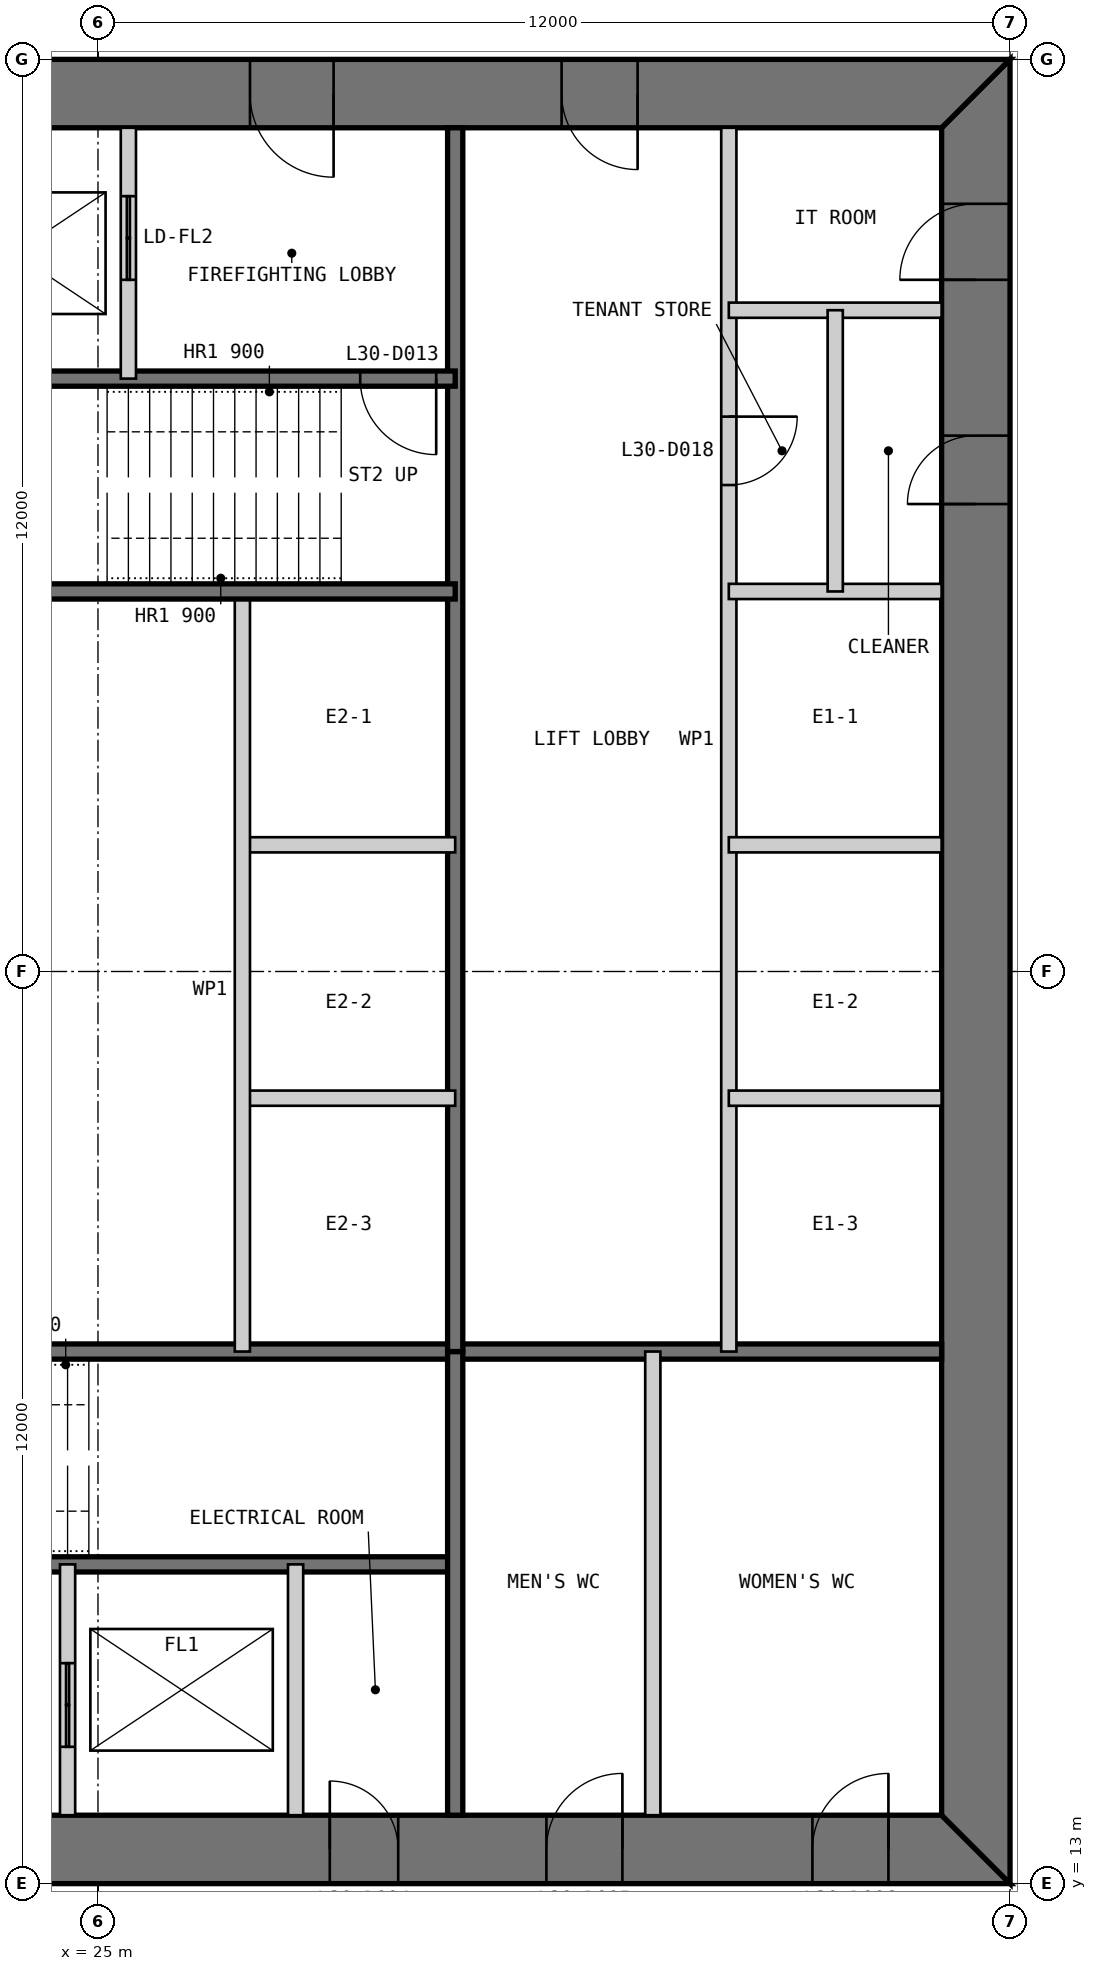
"""IFC4 building model, lengths in metres.
Left out: names, types, materials, properties, quantities, classifications, styles, units other than length and angle.
Written with IfcOpenShell. Run it as: python <this file> out.ifc"""

import sys

from ifc_helpers import new_model, si_unit, direction, frame, frame_2d, origin, place, context, subcontext, project, spatial, polyline, rectangle, outline, extrude, element, fill, save


model = new_model("IFC4")
c1 = context("Model", 3, precision=1e-05, world=origin(), true_north=direction((0.0, 1.0)))
c2 = subcontext(c1, "Body", "Model", "MODEL_VIEW")
j1 = project(units=[si_unit("LENGTHUNIT", "METRE"), si_unit("PLANEANGLEUNIT", "RADIAN")], contexts=[c1])
p1 = place(None, origin())
s1 = spatial("IfcSite", under=j1, at=p1, CompositionType="ELEMENT")
p2 = place(p1, origin())
s2 = spatial("IfcBuilding", under=s1, at=p2, CompositionType="ELEMENT")
p3 = place(p2, frame((0.0, 0.0, 130.4)))
s3 = spatial("IfcBuildingStorey", under=s2, at=p3, CompositionType="ELEMENT", Elevation=130.4)
p4 = place(p3, frame((13.0, 13.45, 0.0), z_axis=(0.0, 0.0, 1.0), x_axis=(1.0, 0.0, 0.0)))
e1 = element("IfcWall", 1, at=p4, inside=s3, PredefinedType="SHEAR", context=c2, shape_type="SweptSolid", body=[
    extrude(outline(polyline([(0.0, -0.45), (24.0, -0.45), (23.1, 0.45), (0.9, 0.45), (0.0, -0.45)])), origin(), (0.0, 0.0, 1.0), 4.0),
])
p5 = place(p4, frame((4.9, 0.0, 0.0)))
e2 = element("IfcOpeningElement", 2, at=p5, cuts=e1, PredefinedType="OPENING", context=c2, shape_type="SweptSolid", body=[
    extrude(rectangle(XDim=1.0, YDim=2.2, at=frame_2d((0.5, 1.1))), frame((0.0, 0.46, 0.0), z_axis=(0.0, -1.0, 0.0), x_axis=(1.0, 0.0, 0.0)), (0.0, 0.0, 1.0), 0.92),
])
p6 = place(p4, frame((8.9, 0.0, 0.0)))
e3 = element("IfcOpeningElement", 3, at=p6, cuts=e1, PredefinedType="OPENING", context=c2, shape_type="SweptSolid", body=[
    extrude(rectangle(XDim=1.1, YDim=2.2, at=frame_2d((0.55, 1.1))), frame((0.0, 0.46, 0.0), z_axis=(0.0, -1.0, 0.0), x_axis=(1.0, 0.0, 0.0)), (0.0, 0.0, 1.0), 0.92),
])
p7 = place(p4, frame((15.05, 0.0, 0.0)))
e4 = element("IfcOpeningElement", 4, at=p7, cuts=e1, PredefinedType="OPENING", context=c2, shape_type="SweptSolid", body=[
    extrude(rectangle(XDim=0.9, YDim=2.2, at=frame_2d((0.45, 1.1))), frame((0.0, 0.46, 0.0), z_axis=(0.0, -1.0, 0.0), x_axis=(1.0, 0.0, 0.0)), (0.0, 0.0, 1.0), 0.92),
])
p8 = place(p4, frame((17.9, 0.0, 0.0)))
e5 = element("IfcOpeningElement", 5, at=p8, cuts=e1, PredefinedType="OPENING", context=c2, shape_type="SweptSolid", body=[
    extrude(rectangle(XDim=1.0, YDim=2.2, at=frame_2d((0.5, 1.1))), frame((0.0, 0.46, 0.0), z_axis=(0.0, -1.0, 0.0), x_axis=(1.0, 0.0, 0.0)), (0.0, 0.0, 1.0), 0.92),
])
p9 = place(p4, frame((21.4, 0.0, 0.0)))
e6 = element("IfcOpeningElement", 6, at=p9, cuts=e1, PredefinedType="OPENING", context=c2, shape_type="SweptSolid", body=[
    extrude(rectangle(XDim=1.0, YDim=2.2, at=frame_2d((0.5, 1.1))), frame((0.0, 0.46, 0.0), z_axis=(0.0, -1.0, 0.0), x_axis=(1.0, 0.0, 0.0)), (0.0, 0.0, 1.0), 0.92),
])
p10 = place(p3, frame((36.55, 13.9, 0.0), z_axis=(0.0, 0.0, 1.0), x_axis=(0.0, 1.0, 0.0)))
e7 = element("IfcWall", 7, at=p10, inside=s3, PredefinedType="SHEAR", context=c2, shape_type="SweptSolid", body=[
    extrude(outline(polyline([(-0.9, -0.45), (23.1, -0.45), (22.2, 0.45), (0.0, 0.45), (-0.9, -0.45)])), origin(), (0.0, 0.0, 1.0), 4.0),
])
p11 = place(p10, frame((20.2, 0.0, 0.0)))
e8 = element("IfcOpeningElement", 8, at=p11, cuts=e7, PredefinedType="OPENING", context=c2, shape_type="SweptSolid", body=[
    extrude(rectangle(XDim=1.0, YDim=2.2, at=frame_2d((0.5, 1.1))), frame((0.0, 0.46, 0.0), z_axis=(0.0, -1.0, 0.0), x_axis=(1.0, 0.0, 0.0)), (0.0, 0.0, 1.0), 0.92),
])
p12 = place(p10, frame((17.25, 0.0, 0.0)))
e9 = element("IfcOpeningElement", 9, at=p12, cuts=e7, PredefinedType="OPENING", context=c2, shape_type="SweptSolid", body=[
    extrude(rectangle(XDim=0.9, YDim=2.2, at=frame_2d((0.45, 1.1))), frame((0.0, 0.46, 0.0), z_axis=(0.0, -1.0, 0.0), x_axis=(1.0, 0.0, 0.0)), (0.0, 0.0, 1.0), 0.92),
])
p13 = place(p3, frame((37.0, 36.55, 0.0), z_axis=(0.0, 0.0, 1.0), x_axis=(-1.0, 0.0, 0.0)))
e10 = element("IfcWall", 10, at=p13, inside=s3, PredefinedType="SHEAR", context=c2, shape_type="SweptSolid", body=[
    extrude(outline(polyline([(0.0, -0.45), (24.0, -0.45), (23.1, 0.45), (0.9, 0.45), (0.0, -0.45)])), origin(), (0.0, 0.0, 1.0), 4.0),
])
p14 = place(p13, frame((4.9, 0.0, 0.0)))
e11 = element("IfcOpeningElement", 11, at=p14, cuts=e10, PredefinedType="OPENING", context=c2, shape_type="SweptSolid", body=[
    extrude(rectangle(XDim=1.0, YDim=2.2, at=frame_2d((0.5, 1.1))), frame((0.0, 0.46, 0.0), z_axis=(0.0, -1.0, 0.0), x_axis=(1.0, 0.0, 0.0)), (0.0, 0.0, 1.0), 0.92),
])
p15 = place(p13, frame((8.9, 0.0, 0.0)))
e12 = element("IfcOpeningElement", 12, at=p15, cuts=e10, PredefinedType="OPENING", context=c2, shape_type="SweptSolid", body=[
    extrude(rectangle(XDim=1.1, YDim=2.2, at=frame_2d((0.55, 1.1))), frame((0.0, 0.46, 0.0), z_axis=(0.0, -1.0, 0.0), x_axis=(1.0, 0.0, 0.0)), (0.0, 0.0, 1.0), 0.92),
])
p16 = place(p13, frame((15.05, 0.0, 0.0)))
e13 = element("IfcOpeningElement", 13, at=p16, cuts=e10, PredefinedType="OPENING", context=c2, shape_type="SweptSolid", body=[
    extrude(rectangle(XDim=0.9, YDim=2.2, at=frame_2d((0.45, 1.1))), frame((0.0, 0.46, 0.0), z_axis=(0.0, -1.0, 0.0), x_axis=(1.0, 0.0, 0.0)), (0.0, 0.0, 1.0), 0.92),
])
p17 = place(p13, frame((17.9, 0.0, 0.0)))
e14 = element("IfcOpeningElement", 14, at=p17, cuts=e10, PredefinedType="OPENING", context=c2, shape_type="SweptSolid", body=[
    extrude(rectangle(XDim=1.0, YDim=2.2, at=frame_2d((0.5, 1.1))), frame((0.0, 0.46, 0.0), z_axis=(0.0, -1.0, 0.0), x_axis=(1.0, 0.0, 0.0)), (0.0, 0.0, 1.0), 0.92),
])
p18 = place(p13, frame((21.4, 0.0, 0.0)))
e15 = element("IfcOpeningElement", 15, at=p18, cuts=e10, PredefinedType="OPENING", context=c2, shape_type="SweptSolid", body=[
    extrude(rectangle(XDim=1.0, YDim=2.2, at=frame_2d((0.5, 1.1))), frame((0.0, 0.46, 0.0), z_axis=(0.0, -1.0, 0.0), x_axis=(1.0, 0.0, 0.0)), (0.0, 0.0, 1.0), 0.92),
])
p19 = place(p3, frame((20.3, 17.2, 0.0), z_axis=(0.0, 0.0, 1.0), x_axis=(1.0, 0.0, 0.0)))
e16 = element("IfcWall", 16, at=p19, inside=s3, PredefinedType="SOLIDWALL", context=c2, shape_type="SweptSolid", body=[
    extrude(rectangle(XDim=9.4, YDim=0.2, at=frame_2d((4.7, 0.0))), origin(), (0.0, 0.0, 1.0), 3.8),
])
p20 = place(p19, frame((0.25, 0.0, 0.0)))
e17 = element("IfcOpeningElement", 17, at=p20, cuts=e16, PredefinedType="OPENING", context=c2, shape_type="SweptSolid", body=[
    extrude(rectangle(XDim=1.0, YDim=2.2, at=frame_2d((0.5, 1.1))), frame((0.0, 0.11, 0.0), z_axis=(0.0, -1.0, 0.0), x_axis=(1.0, 0.0, 0.0)), (0.0, 0.0, 1.0), 0.22),
])
p21 = place(p3, frame((20.3, 20.0, 0.0), z_axis=(0.0, 0.0, 1.0), x_axis=(1.0, 0.0, 0.0)))
e18 = element("IfcWall", 18, at=p21, inside=s3, PredefinedType="SOLIDWALL", context=c2, shape_type="SweptSolid", body=[
    extrude(rectangle(XDim=15.8, YDim=0.2, at=frame_2d((7.9, 0.0))), origin(), (0.0, 0.0, 1.0), 3.8),
])
p22 = place(p3, frame((24.6, 13.9, 0.0), z_axis=(0.0, 0.0, 1.0), x_axis=(0.0, 1.0, 0.0)))
e19 = element("IfcWall", 19, at=p22, inside=s3, PredefinedType="PARTITIONING", context=c2, shape_type="SweptSolid", body=[
    extrude(rectangle(XDim=3.3, YDim=0.2, at=frame_2d((1.65, 0.0))), origin(), (0.0, 0.0, 1.0), 3.8),
])
p23 = place(p22, frame((0.9, 0.0, 0.0)))
e20 = element("IfcOpeningElement", 20, at=p23, cuts=e19, PredefinedType="OPENING", context=c2, shape_type="SweptSolid", body=[
    extrude(rectangle(XDim=1.1, YDim=2.2, at=frame_2d((0.55, 1.1))), frame((0.0, 0.11, 0.0), z_axis=(0.0, -1.0, 0.0), x_axis=(1.0, 0.0, 0.0)), (0.0, 0.0, 1.0), 0.22),
])
p24 = place(p3, frame((27.6, 13.9, 0.0), z_axis=(0.0, 0.0, 1.0), x_axis=(0.0, 1.0, 0.0)))
e21 = element("IfcWall", 21, at=p24, inside=s3, PredefinedType="PARTITIONING", context=c2, shape_type="SweptSolid", body=[
    extrude(rectangle(XDim=3.3, YDim=0.2, at=frame_2d((1.65, 0.0))), origin(), (0.0, 0.0, 1.0), 3.8),
])
p25 = place(p3, frame((29.7, 13.9, 0.0), z_axis=(0.0, 0.0, 1.0), x_axis=(0.0, 1.0, 0.0)))
e22 = element("IfcWall", 22, at=p25, inside=s3, PredefinedType="SOLIDWALL", context=c2, shape_type="SweptSolid", body=[
    extrude(rectangle(XDim=6.1, YDim=0.2, at=frame_2d((3.05, 0.0))), origin(), (0.0, 0.0, 1.0), 3.8),
])
p26 = place(p3, frame((32.3, 13.9, 0.0), z_axis=(0.0, 0.0, 1.0), x_axis=(0.0, 1.0, 0.0)))
e23 = element("IfcWall", 23, at=p26, inside=s3, PredefinedType="PARTITIONING", context=c2, shape_type="SweptSolid", body=[
    extrude(rectangle(XDim=6.1, YDim=0.2, at=frame_2d((3.05, 0.0))), origin(), (0.0, 0.0, 1.0), 3.8),
])
p27 = place(p3, frame((33.3, 36.1, 0.0), z_axis=(0.0, 0.0, 1.0), x_axis=(0.0, -1.0, 0.0)))
e24 = element("IfcWall", 24, at=p27, inside=s3, PredefinedType="PARTITIONING", context=c2, shape_type="SweptSolid", body=[
    extrude(rectangle(XDim=16.1, YDim=0.2, at=frame_2d((8.05, 0.0))), origin(), (0.0, 0.0, 1.0), 3.8),
])
p28 = place(p27, frame((3.8, 0.0, 0.0)))
e25 = element("IfcOpeningElement", 25, at=p28, cuts=e24, PredefinedType="OPENING", context=c2, shape_type="SweptSolid", body=[
    extrude(rectangle(XDim=0.9, YDim=2.2, at=frame_2d((0.45, 1.1))), frame((0.0, 0.11, 0.0), z_axis=(0.0, -1.0, 0.0), x_axis=(1.0, 0.0, 0.0)), (0.0, 0.0, 1.0), 0.22),
])
p29 = place(p3, frame((29.7, 36.1, 0.0), z_axis=(0.0, 0.0, 1.0), x_axis=(0.0, -1.0, 0.0)))
e26 = element("IfcWall", 26, at=p29, inside=s3, PredefinedType="SOLIDWALL", context=c2, shape_type="SweptSolid", body=[
    extrude(rectangle(XDim=16.1, YDim=0.2, at=frame_2d((8.05, 0.0))), origin(), (0.0, 0.0, 1.0), 3.8),
])
for number, where, z_axis, x_axis in (
    (27, (36.1, 30.0, 0.0), (0.0, 0.0, 1.0), (-1.0, 0.0, 0.0)),
    (28, (36.1, 26.667, 0.0), (0.0, 0.0, 1.0), (-1.0, 0.0, 0.0)),
    (29, (36.1, 23.333, 0.0), (0.0, 0.0, 1.0), (-1.0, 0.0, 0.0)),
    (30, (29.7, 26.667, 0.0), (0.0, 0.0, 1.0), (-1.0, 0.0, 0.0)),
    (31, (29.7, 23.333, 0.0), (0.0, 0.0, 1.0), (-1.0, 0.0, 0.0)),
):
    element("IfcWall", number, at=place(p3, frame(where, z_axis=z_axis, x_axis=x_axis)), inside=s3, PredefinedType="PARTITIONING", context=c2, shape_type="SweptSolid", body=[
        extrude(rectangle(XDim=2.8, YDim=0.2, at=frame_2d((1.4, 0.0))), origin(), (0.0, 0.0, 1.0), 3.8),
    ])
p30 = place(p3, frame((26.9, 30.0, 0.0), z_axis=(0.0, 0.0, 1.0), x_axis=(0.0, -1.0, 0.0)))
e32 = element("IfcWall", 32, at=p30, inside=s3, PredefinedType="PARTITIONING", context=c2, shape_type="SweptSolid", body=[
    extrude(rectangle(XDim=10.0, YDim=0.2, at=frame_2d((5.0, 0.0))), origin(), (0.0, 0.0, 1.0), 3.8),
])
p31 = place(p3, frame((29.7, 32.8, 0.0), z_axis=(0.0, 0.0, 1.0), x_axis=(-1.0, 0.0, 0.0)))
e33 = element("IfcWall", 33, at=p31, inside=s3, PredefinedType="SOLIDWALL", context=c2, shape_type="SweptSolid", body=[
    extrude(rectangle(XDim=9.4, YDim=0.2, at=frame_2d((4.7, 0.0))), origin(), (0.0, 0.0, 1.0), 3.8),
])
p32 = place(p31, frame((0.25, 0.0, 0.0)))
e34 = element("IfcOpeningElement", 34, at=p32, cuts=e33, PredefinedType="OPENING", context=c2, shape_type="SweptSolid", body=[
    extrude(rectangle(XDim=1.0, YDim=2.2, at=frame_2d((0.5, 1.1))), frame((0.0, 0.11, 0.0), z_axis=(0.0, -1.0, 0.0), x_axis=(1.0, 0.0, 0.0)), (0.0, 0.0, 1.0), 0.22),
])
p33 = place(p3, frame((29.7, 30.0, 0.0), z_axis=(0.0, 0.0, 1.0), x_axis=(-1.0, 0.0, 0.0)))
e35 = element("IfcWall", 35, at=p33, inside=s3, PredefinedType="SOLIDWALL", context=c2, shape_type="SweptSolid", body=[
    extrude(rectangle(XDim=15.8, YDim=0.2, at=frame_2d((7.9, 0.0))), origin(), (0.0, 0.0, 1.0), 3.8),
])
p34 = place(p3, frame((25.4, 36.1, 0.0), z_axis=(0.0, 0.0, 1.0), x_axis=(0.0, -1.0, 0.0)))
e36 = element("IfcWall", 36, at=p34, inside=s3, PredefinedType="PARTITIONING", context=c2, shape_type="SweptSolid", body=[
    extrude(rectangle(XDim=3.3, YDim=0.2, at=frame_2d((1.65, 0.0))), origin(), (0.0, 0.0, 1.0), 3.8),
])
p35 = place(p34, frame((0.9, 0.0, 0.0)))
e37 = element("IfcOpeningElement", 37, at=p35, cuts=e36, PredefinedType="OPENING", context=c2, shape_type="SweptSolid", body=[
    extrude(rectangle(XDim=1.1, YDim=2.2, at=frame_2d((0.55, 1.1))), frame((0.0, 0.11, 0.0), z_axis=(0.0, -1.0, 0.0), x_axis=(1.0, 0.0, 0.0)), (0.0, 0.0, 1.0), 0.22),
])
p36 = place(p3, frame((36.1, 33.7, 0.0), z_axis=(0.0, 0.0, 1.0), x_axis=(-1.0, 0.0, 0.0)))
e38 = element("IfcWall", 38, at=p36, inside=s3, PredefinedType="PARTITIONING", context=c2, shape_type="SweptSolid", body=[
    extrude(rectangle(XDim=2.8, YDim=0.2, at=frame_2d((1.4, 0.0))), origin(), (0.0, 0.0, 1.0), 3.8),
])
p37 = place(p3, frame((34.7, 33.7, 0.0), z_axis=(0.0, 0.0, 1.0), x_axis=(0.0, -1.0, 0.0)))
e39 = element("IfcWall", 39, at=p37, inside=s3, PredefinedType="PARTITIONING", context=c2, shape_type="SweptSolid", body=[
    extrude(rectangle(XDim=3.7, YDim=0.2, at=frame_2d((1.85, 0.0))), origin(), (0.0, 0.0, 1.0), 3.8),
])
p38 = place(p7, origin())
e40 = element("IfcDoor", 40, at=p38, inside=s3, OperationType="SINGLE_SWING_LEFT", PredefinedType="DOOR", context=c2, shape_type="SweptSolid", body=[
    extrude(rectangle(XDim=0.9, YDim=2.2, at=frame_2d((0.45, 1.1))), frame((0.0, 0.025, 0.0), z_axis=(0.0, -1.0, 0.0), x_axis=(1.0, 0.0, 0.0)), (0.0, 0.0, 1.0), 0.05),
    extrude(outline(polyline([(0.0, 0.0), (0.04, 0.0), (0.04, 2.16), (0.86, 2.16), (0.86, 0.0), (0.9, 0.0), (0.9, 2.2), (0.0, 2.2), (0.0, 0.0)])), frame((0.0, 0.3, 0.0), z_axis=(0.0, -1.0, 0.0), x_axis=(1.0, 0.0, 0.0)), (0.0, 0.0, 1.0), 0.6),
])
fill(e4, e40)
p39 = place(p8, origin())
e41 = element("IfcDoor", 41, at=p39, inside=s3, OperationType="SINGLE_SWING_RIGHT", PredefinedType="DOOR", context=c2, shape_type="SweptSolid", body=[
    extrude(rectangle(XDim=1.0, YDim=2.2, at=frame_2d((0.5, 1.1))), frame((0.0, 0.025, 0.0), z_axis=(0.0, -1.0, 0.0), x_axis=(1.0, 0.0, 0.0)), (0.0, 0.0, 1.0), 0.05),
    extrude(outline(polyline([(0.0, 0.0), (0.04, 0.0), (0.04, 2.16), (0.96, 2.16), (0.96, 0.0), (1.0, 0.0), (1.0, 2.2), (0.0, 2.2), (0.0, 0.0)])), frame((0.0, 0.3, 0.0), z_axis=(0.0, -1.0, 0.0), x_axis=(1.0, 0.0, 0.0)), (0.0, 0.0, 1.0), 0.6),
])
fill(e5, e41)
p40 = place(p9, origin())
e42 = element("IfcDoor", 42, at=p40, inside=s3, OperationType="SINGLE_SWING_RIGHT", PredefinedType="DOOR", context=c2, shape_type="SweptSolid", body=[
    extrude(rectangle(XDim=1.0, YDim=2.2, at=frame_2d((0.5, 1.1))), frame((0.0, 0.025, 0.0), z_axis=(0.0, -1.0, 0.0), x_axis=(1.0, 0.0, 0.0)), (0.0, 0.0, 1.0), 0.05),
    extrude(outline(polyline([(0.0, 0.0), (0.04, 0.0), (0.04, 2.16), (0.96, 2.16), (0.96, 0.0), (1.0, 0.0), (1.0, 2.2), (0.0, 2.2), (0.0, 0.0)])), frame((0.0, 0.3, 0.0), z_axis=(0.0, -1.0, 0.0), x_axis=(1.0, 0.0, 0.0)), (0.0, 0.0, 1.0), 0.6),
])
fill(e6, e42)
p41 = place(p14, origin())
e43 = element("IfcDoor", 43, at=p41, inside=s3, OperationType="SINGLE_SWING_LEFT", PredefinedType="DOOR", context=c2, shape_type="SweptSolid", body=[
    extrude(rectangle(XDim=1.0, YDim=2.2, at=frame_2d((0.5, 1.1))), frame((0.0, 0.025, 0.0), z_axis=(0.0, -1.0, 0.0), x_axis=(1.0, 0.0, 0.0)), (0.0, 0.0, 1.0), 0.05),
    extrude(outline(polyline([(0.0, 0.0), (0.04, 0.0), (0.04, 2.16), (0.96, 2.16), (0.96, 0.0), (1.0, 0.0), (1.0, 2.2), (0.0, 2.2), (0.0, 0.0)])), frame((0.0, 0.3, 0.0), z_axis=(0.0, -1.0, 0.0), x_axis=(1.0, 0.0, 0.0)), (0.0, 0.0, 1.0), 0.6),
])
fill(e11, e43)
p42 = place(p15, origin())
e44 = element("IfcDoor", 44, at=p42, inside=s3, OperationType="SINGLE_SWING_LEFT", PredefinedType="DOOR", context=c2, shape_type="SweptSolid", body=[
    extrude(rectangle(XDim=1.1, YDim=2.2, at=frame_2d((0.55, 1.1))), frame((0.0, 0.025, 0.0), z_axis=(0.0, -1.0, 0.0), x_axis=(1.0, 0.0, 0.0)), (0.0, 0.0, 1.0), 0.05),
    extrude(outline(polyline([(0.0, 0.0), (0.04, 0.0), (0.04, 2.16), (1.06, 2.16), (1.06, 0.0), (1.1, 0.0), (1.1, 2.2), (0.0, 2.2), (0.0, 0.0)])), frame((0.0, 0.3, 0.0), z_axis=(0.0, -1.0, 0.0), x_axis=(1.0, 0.0, 0.0)), (0.0, 0.0, 1.0), 0.6),
])
fill(e12, e44)
p43 = place(p32, origin())
e45 = element("IfcDoor", 45, at=p43, inside=s3, OperationType="SINGLE_SWING_LEFT", PredefinedType="DOOR", context=c2, shape_type="SweptSolid", body=[
    extrude(rectangle(XDim=1.0, YDim=2.2, at=frame_2d((0.5, 1.1))), frame((0.0, 0.025, 0.0), z_axis=(0.0, -1.0, 0.0), x_axis=(1.0, 0.0, 0.0)), (0.0, 0.0, 1.0), 0.05),
])
fill(e34, e45)
p44 = place(p11, origin())
e46 = element("IfcDoor", 46, at=p44, inside=s3, OperationType="SINGLE_SWING_LEFT", PredefinedType="DOOR", context=c2, shape_type="SweptSolid", body=[
    extrude(rectangle(XDim=1.0, YDim=2.2, at=frame_2d((0.5, 1.1))), frame((0.0, 0.025, 0.0), z_axis=(0.0, -1.0, 0.0), x_axis=(1.0, 0.0, 0.0)), (0.0, 0.0, 1.0), 0.05),
    extrude(outline(polyline([(0.0, 0.0), (0.04, 0.0), (0.04, 2.16), (0.96, 2.16), (0.96, 0.0), (1.0, 0.0), (1.0, 2.2), (0.0, 2.2), (0.0, 0.0)])), frame((0.0, 0.3, 0.0), z_axis=(0.0, -1.0, 0.0), x_axis=(1.0, 0.0, 0.0)), (0.0, 0.0, 1.0), 0.6),
])
fill(e8, e46)
p45 = place(p28, origin())
e47 = element("IfcDoor", 47, at=p45, inside=s3, OperationType="SINGLE_SWING_LEFT", PredefinedType="DOOR", context=c2, shape_type="SweptSolid", body=[
    extrude(rectangle(XDim=0.9, YDim=2.2, at=frame_2d((0.45, 1.1))), frame((0.0, 0.025, 0.0), z_axis=(0.0, -1.0, 0.0), x_axis=(1.0, 0.0, 0.0)), (0.0, 0.0, 1.0), 0.05),
])
fill(e25, e47)
p46 = place(p12, origin())
e48 = element("IfcDoor", 48, at=p46, inside=s3, OperationType="SINGLE_SWING_LEFT", PredefinedType="DOOR", context=c2, shape_type="SweptSolid", body=[
    extrude(rectangle(XDim=0.9, YDim=2.2, at=frame_2d((0.45, 1.1))), frame((0.0, 0.025, 0.0), z_axis=(0.0, -1.0, 0.0), x_axis=(1.0, 0.0, 0.0)), (0.0, 0.0, 1.0), 0.05),
    extrude(outline(polyline([(0.0, 0.0), (0.04, 0.0), (0.04, 2.16), (0.86, 2.16), (0.86, 0.0), (0.9, 0.0), (0.9, 2.2), (0.0, 2.2), (0.0, 0.0)])), frame((0.0, 0.3, 0.0), z_axis=(0.0, -1.0, 0.0), x_axis=(1.0, 0.0, 0.0)), (0.0, 0.0, 1.0), 0.6),
])
fill(e9, e48)
p47 = place(p23, origin())
e49 = element("IfcDoor", 49, at=p47, inside=s3, OperationType="DOUBLE_DOOR_SLIDING", PredefinedType="DOOR", context=c2, shape_type="SweptSolid", body=[
    extrude(rectangle(XDim=1.1, YDim=2.2, at=frame_2d((0.55, 1.1))), frame((0.0, 0.025, 0.0), z_axis=(0.0, -1.0, 0.0), x_axis=(1.0, 0.0, 0.0)), (0.0, 0.0, 1.0), 0.05),
])
fill(e20, e49)
p48 = place(p35, origin())
e50 = element("IfcDoor", 50, at=p48, inside=s3, OperationType="DOUBLE_DOOR_SLIDING", PredefinedType="DOOR", context=c2, shape_type="SweptSolid", body=[
    extrude(rectangle(XDim=1.1, YDim=2.2, at=frame_2d((0.55, 1.1))), frame((0.0, 0.025, 0.0), z_axis=(0.0, -1.0, 0.0), x_axis=(1.0, 0.0, 0.0)), (0.0, 0.0, 1.0), 0.05),
])
fill(e37, e50)
save(model, sys.argv[1])
